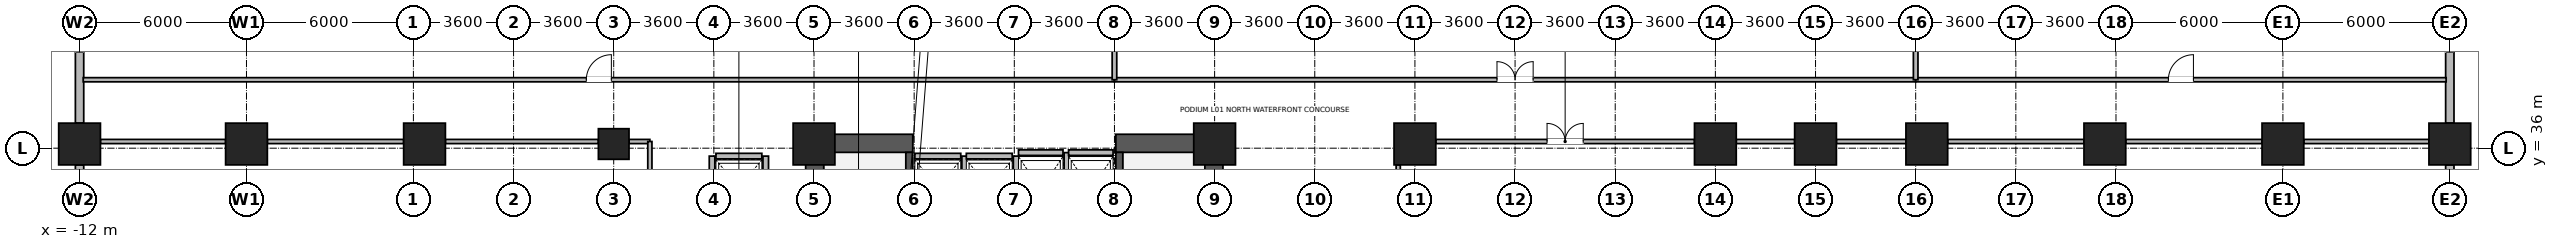
"""IFC4 building model, lengths in metres.
Left out: names, types, materials, properties, quantities, classifications, styles, units other than length and angle.
Written with IfcOpenShell. Run it as: python <this file> out.ifc"""

import sys

from ifc_helpers import new_model, si_unit, direction, frame, frame_2d, origin, origin_2d, place, context, subcontext, project, spatial, rectangle, circle, extrude, source, transform, mapped, element, fill, save


model = new_model("IFC4")
c1 = context("Model", 3, precision=1e-05, world=origin(), true_north=direction((0.0, 1.0)))
c2 = subcontext(c1, "Body", "Model", "MODEL_VIEW")
j1 = project(units=[si_unit("LENGTHUNIT", "METRE"), si_unit("PLANEANGLEUNIT", "RADIAN")], contexts=[c1])
p1 = place(None, origin())
s1 = spatial("IfcSite", under=j1, at=p1, CompositionType="ELEMENT")
p2 = place(p1, origin())
s2 = spatial("IfcBuilding", under=s1, at=p2, CompositionType="ELEMENT")
p3 = place(p2, frame((0.0, 0.0, 5.4)))
s3 = spatial("IfcBuildingStorey", under=s2, at=p3, CompositionType="ELEMENT", Elevation=5.4)
for number, where, z_axis, x_axis in (
    (1, (14.425, 28.2, 0.0), (0.0, 0.0, 1.0), (0.0, 1.0, 0.0)),
    (2, (28.775, 28.2, 0.0), (0.0, 0.0, 1.0), (0.0, 1.0, 0.0)),
):
    element("IfcWall", number, at=place(p3, frame(where, z_axis=z_axis, x_axis=x_axis)), inside=s3, PredefinedType="SHEAR", context=c2, shape_type="SweptSolid", body=[
        extrude(rectangle(XDim=8.3, YDim=0.65, at=frame_2d((4.15, 0.0))), origin(), (0.0, 0.0, 1.0), 4.52),
    ])
for number, where, z_axis, x_axis in (
    (3, (14.75, 36.175, 0.0), (0.0, 0.0, 1.0), (1.0, 0.0, 0.0)),
    (4, (25.25, 36.175, 0.0), (0.0, 0.0, 1.0), (1.0, 0.0, 0.0)),
):
    element("IfcWall", number, at=place(p3, frame(where, z_axis=z_axis, x_axis=x_axis)), inside=s3, PredefinedType="SHEAR", context=c2, shape_type="SweptSolid", body=[
        extrude(rectangle(XDim=3.2, YDim=0.65, at=frame_2d((1.6, 0.0))), origin(), (0.0, 0.0, 1.0), 4.52),
    ])
p4 = place(p3, frame((17.825, 28.85, 0.0), z_axis=(0.0, 0.0, 1.0), x_axis=(0.0, 1.0, 0.0)))
e5 = element("IfcWall", 5, at=p4, inside=s3, PredefinedType="SHEAR", context=c2, shape_type="SweptSolid", body=[
    extrude(rectangle(XDim=7.0, YDim=0.25, at=frame_2d((3.5, 0.0))), origin(), (0.0, 0.0, 1.0), 4.52),
])
p5 = place(p4, frame((0.15, 0.0, 0.0)))
e6 = element("IfcOpeningElement", 6, at=p5, cuts=e5, PredefinedType="OPENING", context=c2, shape_type="SweptSolid", body=[
    extrude(rectangle(XDim=1.1, YDim=2.08, at=frame_2d((0.55, 1.04))), frame((0.0, 0.135, 0.0), z_axis=(0.0, -1.0, 0.0), x_axis=(1.0, 0.0, 0.0)), (0.0, 0.0, 1.0), 0.27),
])
p6 = place(p3, frame((25.375, 28.85, 0.0), z_axis=(0.0, 0.0, 1.0), x_axis=(0.0, 1.0, 0.0)))
e7 = element("IfcWall", 7, at=p6, inside=s3, PredefinedType="SHEAR", context=c2, shape_type="SweptSolid", body=[
    extrude(rectangle(XDim=7.0, YDim=0.25, at=frame_2d((3.5, 0.0))), origin(), (0.0, 0.0, 1.0), 4.52),
])
p7 = place(p6, frame((0.15, 0.0, 0.0)))
e8 = element("IfcOpeningElement", 8, at=p7, cuts=e7, PredefinedType="OPENING", context=c2, shape_type="SweptSolid", body=[
    extrude(rectangle(XDim=1.1, YDim=2.08, at=frame_2d((0.55, 1.04))), frame((0.0, 0.135, 0.0), z_axis=(0.0, -1.0, 0.0), x_axis=(1.0, 0.0, 0.0)), (0.0, 0.0, 1.0), 0.27),
])
m1 = source(origin(), c2, "Body", "SweptSolid", [
    extrude(circle(Radius=0.55, at=origin_2d()), origin(), (0.0, 0.0, 1.0), 4.8),
])
p8 = place(p3, frame((7.2, 36.15, 0.0), z_axis=(0.0, 0.0, 1.0), x_axis=(1.0, 0.0, 0.0)))
e9 = element("IfcColumn", 9, at=p8, inside=s3, PredefinedType="COLUMN", context=c2, shape_type="MappedRepresentation", body=[
    mapped(m1, transform((0.0, 0.0, 0.0), x_axis=(1.0, 0.0, 0.0), y_axis=(0.0, 1.0, 0.0), z_axis=(0.0, 0.0, 1.0), scale=1.0)),
])
m2 = source(origin(), c2, "Body", "SweptSolid", [
    extrude(rectangle(XDim=1.5, YDim=1.5, at=origin_2d()), origin(), (0.0, 0.0, 1.0), 4.8),
])
for number, where, z_axis, x_axis in (
    (10, (14.4, 36.15, 0.0), (0.0, 0.0, 1.0), (1.0, 0.0, 0.0)),
    (11, (28.8, 36.15, 0.0), (0.0, 0.0, 1.0), (1.0, 0.0, 0.0)),
    (12, (36.0, 36.15, 0.0), (0.0, 0.0, 1.0), (1.0, 0.0, 0.0)),
    (13, (46.8, 36.15, 0.0), (0.0, 0.0, 1.0), (1.0, 0.0, 0.0)),
    (14, (50.4, 36.15, 0.0), (0.0, 0.0, 1.0), (1.0, 0.0, 0.0)),
    (15, (54.4, 36.15, 0.0), (0.0, 0.0, 1.0), (1.0, 0.0, 0.0)),
    (16, (0.4, 36.15, 0.0), (0.0, 0.0, 1.0), (1.0, 0.0, 0.0)),
    (17, (60.8, 36.15, 0.0), (0.0, 0.0, 1.0), (1.0, 0.0, 0.0)),
    (18, (-12.0, 36.15, 0.0), (0.0, 0.0, 1.0), (1.0, 0.0, 0.0)),
    (19, (-6.0, 36.15, 0.0), (0.0, 0.0, 1.0), (1.0, 0.0, 0.0)),
    (20, (67.2, 36.15, 0.0), (0.0, 0.0, 1.0), (1.0, 0.0, 0.0)),
    (21, (73.2, 36.15, 0.0), (0.0, 0.0, 1.0), (1.0, 0.0, 0.0)),
):
    element("IfcColumn", number, at=place(p3, frame(where, z_axis=z_axis, x_axis=x_axis)), inside=s3, PredefinedType="COLUMN", context=c2, shape_type="MappedRepresentation", body=[
        mapped(m2, transform((0.0, 0.0, 0.0), x_axis=(1.0, 0.0, 0.0), y_axis=(0.0, 1.0, 0.0), z_axis=(0.0, 0.0, 1.0), scale=1.0)),
    ])
p9 = place(p3, frame((73.2, 35.399, 0.0), z_axis=(0.0, 0.0, 1.0), x_axis=(0.0, -1.0, 0.0)))
e22 = element("IfcWall", 22, at=p9, inside=s3, PredefinedType="STANDARD", context=c2, shape_type="SweptSolid", body=[
    extrude(rectangle(XDim=5.998, YDim=0.3, at=frame_2d((2.999, 0.0))), origin(), (0.0, 0.0, 1.0), 3.9),
])
p10 = place(p9, frame((2.524, 0.0, 0.9)))
e23 = element("IfcOpeningElement", 23, at=p10, cuts=e22, PredefinedType="OPENING", context=c2, shape_type="SweptSolid", body=[
    extrude(rectangle(XDim=0.95, YDim=1.75, at=frame_2d((0.475, 0.875))), frame((0.0, 0.16, 0.0), z_axis=(0.0, -1.0, 0.0), x_axis=(1.0, 0.0, 0.0)), (0.0, 0.0, 1.0), 0.32),
])
p11 = place(p9, frame((1.037, 0.0, 0.9)))
e24 = element("IfcOpeningElement", 24, at=p11, cuts=e22, PredefinedType="OPENING", context=c2, shape_type="SweptSolid", body=[
    extrude(rectangle(XDim=0.95, YDim=1.75, at=frame_2d((0.475, 0.875))), frame((0.0, 0.16, 0.0), z_axis=(0.0, -1.0, 0.0), x_axis=(1.0, 0.0, 0.0)), (0.0, 0.0, 1.0), 0.32),
])
p12 = place(p3, frame((73.2, 44.099, 0.0), z_axis=(0.0, 0.0, 1.0), x_axis=(0.0, -1.0, 0.0)))
e25 = element("IfcWall", 25, at=p12, inside=s3, PredefinedType="STANDARD", context=c2, shape_type="SweptSolid", body=[
    extrude(rectangle(XDim=7.198, YDim=0.3, at=frame_2d((3.599, 0.0))), origin(), (0.0, 0.0, 1.0), 3.9),
])
p13 = place(p12, frame((0.6, 0.0, 0.9)))
e26 = element("IfcOpeningElement", 26, at=p13, cuts=e25, PredefinedType="OPENING", context=c2, shape_type="SweptSolid", body=[
    extrude(rectangle(XDim=2.4, YDim=2.5, at=frame_2d((1.2, 1.25))), frame((0.0, 0.16, 0.0), z_axis=(0.0, -1.0, 0.0), x_axis=(1.0, 0.0, 0.0)), (0.0, 0.0, 1.0), 0.32),
])
p14 = place(p12, frame((3.7, 0.0, 0.9)))
e27 = element("IfcOpeningElement", 27, at=p14, cuts=e25, PredefinedType="OPENING", context=c2, shape_type="SweptSolid", body=[
    extrude(rectangle(XDim=0.95, YDim=1.75, at=frame_2d((0.475, 0.875))), frame((0.0, 0.16, 0.0), z_axis=(0.0, -1.0, 0.0), x_axis=(1.0, 0.0, 0.0)), (0.0, 0.0, 1.0), 0.32),
])
p15 = place(p3, frame((-12.0, 36.901, 0.0), z_axis=(0.0, 0.0, 1.0), x_axis=(0.0, 1.0, 0.0)))
e28 = element("IfcWall", 28, at=p15, inside=s3, PredefinedType="STANDARD", context=c2, shape_type="SweptSolid", body=[
    extrude(rectangle(XDim=7.198, YDim=0.3, at=frame_2d((3.599, 0.0))), origin(), (0.0, 0.0, 1.0), 3.9),
])
p16 = place(p15, frame((4.198, 0.0, 0.9)))
e29 = element("IfcOpeningElement", 29, at=p16, cuts=e28, PredefinedType="OPENING", context=c2, shape_type="SweptSolid", body=[
    extrude(rectangle(XDim=2.4, YDim=2.5, at=frame_2d((1.2, 1.25))), frame((0.0, 0.16, 0.0), z_axis=(0.0, -1.0, 0.0), x_axis=(1.0, 0.0, 0.0)), (0.0, 0.0, 1.0), 0.32),
])
p17 = place(p15, frame((2.548, 0.0, 0.9)))
e30 = element("IfcOpeningElement", 30, at=p17, cuts=e28, PredefinedType="OPENING", context=c2, shape_type="SweptSolid", body=[
    extrude(rectangle(XDim=0.95, YDim=1.75, at=frame_2d((0.475, 0.875))), frame((0.0, 0.16, 0.0), z_axis=(0.0, -1.0, 0.0), x_axis=(1.0, 0.0, 0.0)), (0.0, 0.0, 1.0), 0.32),
])
p18 = place(p3, frame((-12.0, 29.401, 0.0), z_axis=(0.0, 0.0, 1.0), x_axis=(0.0, 1.0, 0.0)))
e31 = element("IfcWall", 31, at=p18, inside=s3, PredefinedType="STANDARD", context=c2, shape_type="SweptSolid", body=[
    extrude(rectangle(XDim=5.998, YDim=0.3, at=frame_2d((2.999, 0.0))), origin(), (0.0, 0.0, 1.0), 3.9),
])
p19 = place(p18, frame((2.524, 0.0, 0.9)))
e32 = element("IfcOpeningElement", 32, at=p19, cuts=e31, PredefinedType="OPENING", context=c2, shape_type="SweptSolid", body=[
    extrude(rectangle(XDim=0.95, YDim=1.75, at=frame_2d((0.475, 0.875))), frame((0.0, 0.16, 0.0), z_axis=(0.0, -1.0, 0.0), x_axis=(1.0, 0.0, 0.0)), (0.0, 0.0, 1.0), 0.32),
])
p20 = place(p18, frame((1.037, 0.0, 0.9)))
e33 = element("IfcOpeningElement", 33, at=p20, cuts=e31, PredefinedType="OPENING", context=c2, shape_type="SweptSolid", body=[
    extrude(rectangle(XDim=0.95, YDim=1.75, at=frame_2d((0.475, 0.875))), frame((0.0, 0.16, 0.0), z_axis=(0.0, -1.0, 0.0), x_axis=(1.0, 0.0, 0.0)), (0.0, 0.0, 1.0), 0.32),
])
p21 = place(p3, frame((18.025, 35.715, 0.0), z_axis=(0.0, 0.0, 1.0), x_axis=(1.0, 0.0, 0.0)))
e34 = element("IfcWall", 34, at=p21, inside=s3, PredefinedType="PARTITIONING", context=c2, shape_type="SweptSolid", body=[
    extrude(rectangle(XDim=1.65, YDim=0.2, at=frame_2d((0.825, 0.0))), origin(), (0.0, 0.0, 1.0), 4.5),
])
p22 = place(p3, frame((19.815, 33.485, 0.0), z_axis=(0.0, 0.0, 1.0), x_axis=(0.0, 1.0, 0.0)))
e35 = element("IfcWall", 35, at=p22, inside=s3, PredefinedType="PARTITIONING", context=c2, shape_type="SweptSolid", body=[
    extrude(rectangle(XDim=2.23, YDim=0.2, at=frame_2d((1.115, 0.0))), origin(), (0.0, 0.0, 1.0), 4.5),
])
p23 = place(p3, frame((19.875, 35.715, 0.0), z_axis=(0.0, 0.0, 1.0), x_axis=(1.0, 0.0, 0.0)))
e36 = element("IfcWall", 36, at=p23, inside=s3, PredefinedType="PARTITIONING", context=c2, shape_type="SweptSolid", body=[
    extrude(rectangle(XDim=1.65, YDim=0.2, at=frame_2d((0.825, 0.0))), origin(), (0.0, 0.0, 1.0), 4.5),
])
p24 = place(p3, frame((21.665, 33.485, 0.0), z_axis=(0.0, 0.0, 1.0), x_axis=(0.0, 1.0, 0.0)))
e37 = element("IfcWall", 37, at=p24, inside=s3, PredefinedType="PARTITIONING", context=c2, shape_type="SweptSolid", body=[
    extrude(rectangle(XDim=2.23, YDim=0.2, at=frame_2d((1.115, 0.0))), origin(), (0.0, 0.0, 1.0), 4.5),
])
p25 = place(p3, frame((10.875, 35.715, 0.0), z_axis=(0.0, 0.0, 1.0), x_axis=(1.0, 0.0, 0.0)))
e38 = element("IfcWall", 38, at=p25, inside=s3, PredefinedType="PARTITIONING", context=c2, shape_type="SweptSolid", body=[
    extrude(rectangle(XDim=1.65, YDim=0.2, at=frame_2d((0.825, 0.0))), origin(), (0.0, 0.0, 1.0), 4.5),
])
for number, where, z_axis, x_axis in (
    (39, (10.735, 33.485, 0.0), (0.0, 0.0, 1.0), (0.0, 1.0, 0.0)),
    (40, (12.665, 33.485, 0.0), (0.0, 0.0, 1.0), (0.0, 1.0, 0.0)),
):
    element("IfcWall", number, at=place(p3, frame(where, z_axis=z_axis, x_axis=x_axis)), inside=s3, PredefinedType="PARTITIONING", context=c2, shape_type="SweptSolid", body=[
        extrude(rectangle(XDim=2.23, YDim=0.2, at=frame_2d((1.115, 0.0))), origin(), (0.0, 0.0, 1.0), 4.5),
    ])
p26 = place(p3, frame((21.75, 35.84, 0.0), z_axis=(0.0, 0.0, 1.0), x_axis=(1.0, 0.0, 0.0)))
e41 = element("IfcWall", 41, at=p26, inside=s3, PredefinedType="PARTITIONING", context=c2, shape_type="SweptSolid", body=[
    extrude(rectangle(XDim=1.6, YDim=0.2, at=frame_2d((0.8, 0.0))), origin(), (0.0, 0.0, 1.0), 3.3),
])
p27 = place(p3, frame((23.49, 33.16, 0.0), z_axis=(0.0, 0.0, 1.0), x_axis=(0.0, 1.0, 0.0)))
e42 = element("IfcWall", 42, at=p27, inside=s3, PredefinedType="PARTITIONING", context=c2, shape_type="SweptSolid", body=[
    extrude(rectangle(XDim=2.68, YDim=0.2, at=frame_2d((1.34, 0.0))), origin(), (0.0, 0.0, 1.0), 4.5),
])
p28 = place(p3, frame((23.55, 35.84, 0.0), z_axis=(0.0, 0.0, 1.0), x_axis=(1.0, 0.0, 0.0)))
e43 = element("IfcWall", 43, at=p28, inside=s3, PredefinedType="PARTITIONING", context=c2, shape_type="SweptSolid", body=[
    extrude(rectangle(XDim=1.6, YDim=0.2, at=frame_2d((0.8, 0.0))), origin(), (0.0, 0.0, 1.0), 3.3),
])
p29 = place(p3, frame((36.75, 36.24, 0.0), z_axis=(0.0, 0.0, 1.0), x_axis=(1.0, 0.0, 0.0)))
e44 = element("IfcWall", 44, at=p29, inside=s3, PredefinedType="PARTITIONING", context=c2, shape_type="SweptSolid", body=[
    extrude(rectangle(XDim=9.3, YDim=0.15, at=frame_2d((4.65, 0.0))), origin(), (0.0, 0.0, 1.0), 3.8),
])
p30 = place(p29, frame((4.0, 0.0, 0.0)))
e45 = element("IfcOpeningElement", 45, at=p30, cuts=e44, PredefinedType="OPENING", context=c2, shape_type="SweptSolid", body=[
    extrude(rectangle(XDim=1.3, YDim=2.12, at=frame_2d((0.65, 1.06))), frame((0.0, 0.085, 0.0), z_axis=(0.0, -1.0, 0.0), x_axis=(1.0, 0.0, 0.0)), (0.0, 0.0, 1.0), 0.17),
])
p31 = place(p3, frame((47.55, 36.24, 0.0), z_axis=(0.0, 0.0, 1.0), x_axis=(1.0, 0.0, 0.0)))
e46 = element("IfcWall", 46, at=p31, inside=s3, PredefinedType="PARTITIONING", context=c2, shape_type="SweptSolid", body=[
    extrude(rectangle(XDim=2.1, YDim=0.15, at=frame_2d((1.05, 0.0))), origin(), (0.0, 0.0, 1.0), 3.8),
])
p32 = place(p3, frame((51.15, 36.24, 0.0), z_axis=(0.0, 0.0, 1.0), x_axis=(1.0, 0.0, 0.0)))
e47 = element("IfcWall", 47, at=p32, inside=s3, PredefinedType="PARTITIONING", context=c2, shape_type="SweptSolid", body=[
    extrude(rectangle(XDim=2.5, YDim=0.15, at=frame_2d((1.25, 0.0))), origin(), (0.0, 0.0, 1.0), 3.8),
])
p33 = place(p3, frame((55.15, 36.24, 0.0), z_axis=(0.0, 0.0, 1.0), x_axis=(1.0, 0.0, 0.0)))
e48 = element("IfcWall", 48, at=p33, inside=s3, PredefinedType="PARTITIONING", context=c2, shape_type="SweptSolid", body=[
    extrude(rectangle(XDim=4.9, YDim=0.15, at=frame_2d((2.45, 0.0))), origin(), (0.0, 0.0, 1.0), 3.8),
])
p34 = place(p3, frame((61.55, 36.24, 0.0), z_axis=(0.0, 0.0, 1.0), x_axis=(1.0, 0.0, 0.0)))
e49 = element("IfcWall", 49, at=p34, inside=s3, PredefinedType="PARTITIONING", context=c2, shape_type="SweptSolid", body=[
    extrude(rectangle(XDim=4.9, YDim=0.15, at=frame_2d((2.45, 0.0))), origin(), (0.0, 0.0, 1.0), 3.8),
])
p35 = place(p3, frame((67.95, 36.24, 0.0), z_axis=(0.0, 0.0, 1.0), x_axis=(1.0, 0.0, 0.0)))
e50 = element("IfcWall", 50, at=p35, inside=s3, PredefinedType="PARTITIONING", context=c2, shape_type="SweptSolid", body=[
    extrude(rectangle(XDim=4.5, YDim=0.15, at=frame_2d((2.25, 0.0))), origin(), (0.0, 0.0, 1.0), 3.8),
])
p36 = place(p3, frame((-11.868, 38.46, 0.0), z_axis=(0.0, 0.0, 1.0), x_axis=(1.0, 0.0, 0.0)))
e51 = element("IfcWall", 51, at=p36, inside=s3, PredefinedType="PARTITIONING", context=c2, shape_type="SweptSolid", body=[
    extrude(rectangle(XDim=37.068, YDim=0.15, at=frame_2d((18.534, 0.0))), origin(), (0.0, 0.0, 1.0), 4.5),
])
p37 = place(p36, frame((18.084, 0.0, 0.0)))
e52 = element("IfcOpeningElement", 52, at=p37, cuts=e51, PredefinedType="OPENING", context=c2, shape_type="SweptSolid", body=[
    extrude(rectangle(XDim=0.9, YDim=2.08, at=frame_2d((0.45, 1.04))), frame((0.0, 0.085, 0.0), z_axis=(0.0, -1.0, 0.0), x_axis=(1.0, 0.0, 0.0)), (0.0, 0.0, 1.0), 0.17),
])
p38 = place(p3, frame((25.2, 38.46, 0.0), z_axis=(0.0, 0.0, 1.0), x_axis=(1.0, 0.0, 0.0)))
e53 = element("IfcWall", 53, at=p38, inside=s3, PredefinedType="PARTITIONING", context=c2, shape_type="SweptSolid", body=[
    extrude(rectangle(XDim=28.8, YDim=0.15, at=frame_2d((14.4, 0.0))), origin(), (0.0, 0.0, 1.0), 4.5),
])
p39 = place(p38, frame((13.75, 0.0, 0.0)))
e54 = element("IfcOpeningElement", 54, at=p39, cuts=e53, PredefinedType="OPENING", context=c2, shape_type="SweptSolid", body=[
    extrude(rectangle(XDim=1.3, YDim=2.12, at=frame_2d((0.65, 1.06))), frame((0.0, 0.085, 0.0), z_axis=(0.0, -1.0, 0.0), x_axis=(1.0, 0.0, 0.0)), (0.0, 0.0, 1.0), 0.17),
])
p40 = place(p3, frame((35.4, 29.4, 0.0), z_axis=(0.0, 0.0, 1.0), x_axis=(0.0, 1.0, 0.0)))
e55 = element("IfcWall", 55, at=p40, inside=s3, PredefinedType="PARTITIONING", context=c2, shape_type="SweptSolid", body=[
    extrude(rectangle(XDim=6.0, YDim=0.15, at=frame_2d((3.0, 0.0))), origin(), (0.0, 0.0, 1.0), 4.5),
])
p41 = place(p3, frame((-11.25, 36.24, 0.0), z_axis=(0.0, 0.0, 1.0), x_axis=(1.0, 0.0, 0.0)))
e56 = element("IfcWall", 56, at=p41, inside=s3, PredefinedType="PARTITIONING", context=c2, shape_type="SweptSolid", body=[
    extrude(rectangle(XDim=4.5, YDim=0.15, at=frame_2d((2.25, 0.0))), origin(), (0.0, 0.0, 1.0), 3.8),
])
p42 = place(p3, frame((-5.25, 36.24, 0.0), z_axis=(0.0, 0.0, 1.0), x_axis=(1.0, 0.0, 0.0)))
e57 = element("IfcWall", 57, at=p42, inside=s3, PredefinedType="PARTITIONING", context=c2, shape_type="SweptSolid", body=[
    extrude(rectangle(XDim=4.9, YDim=0.15, at=frame_2d((2.45, 0.0))), origin(), (0.0, 0.0, 1.0), 3.8),
])
p43 = place(p3, frame((1.15, 36.24, 0.0), z_axis=(0.0, 0.0, 1.0), x_axis=(1.0, 0.0, 0.0)))
e58 = element("IfcWall", 58, at=p43, inside=s3, PredefinedType="PARTITIONING", context=c2, shape_type="SweptSolid", body=[
    extrude(rectangle(XDim=5.5, YDim=0.15, at=frame_2d((2.75, 0.0))), origin(), (0.0, 0.0, 1.0), 3.8),
])
p44 = place(p3, frame((7.75, 36.24, 0.0), z_axis=(0.0, 0.0, 1.0), x_axis=(1.0, 0.0, 0.0)))
e59 = element("IfcWall", 59, at=p44, inside=s3, PredefinedType="PARTITIONING", context=c2, shape_type="SweptSolid", body=[
    extrude(rectangle(XDim=0.75, YDim=0.15, at=frame_2d((0.375, 0.0))), origin(), (0.0, 0.0, 1.0), 3.8),
])
p45 = place(p3, frame((54.0, 38.46, 0.0), z_axis=(0.0, 0.0, 1.0), x_axis=(1.0, 0.0, 0.0)))
e60 = element("IfcWall", 60, at=p45, inside=s3, PredefinedType="PARTITIONING", context=c2, shape_type="SweptSolid", body=[
    extrude(rectangle(XDim=19.068, YDim=0.15, at=frame_2d((9.534, 0.0))), origin(), (0.0, 0.0, 1.0), 4.5),
])
p46 = place(p45, frame((9.084, 0.0, 0.0)))
e61 = element("IfcOpeningElement", 61, at=p46, cuts=e60, PredefinedType="OPENING", context=c2, shape_type="SweptSolid", body=[
    extrude(rectangle(XDim=0.9, YDim=2.08, at=frame_2d((0.45, 1.04))), frame((0.0, 0.085, 0.0), z_axis=(0.0, -1.0, 0.0), x_axis=(1.0, 0.0, 0.0)), (0.0, 0.0, 1.0), 0.17),
])
p47 = place(p3, frame((8.5, 28.56, 0.0), z_axis=(0.0, 0.0, 1.0), x_axis=(0.0, 1.0, 0.0)))
e62 = element("IfcWall", 62, at=p47, inside=s3, PredefinedType="PARTITIONING", context=c2, shape_type="SweptSolid", body=[
    extrude(rectangle(XDim=7.68, YDim=0.15, at=frame_2d((3.84, 0.0))), origin(), (0.0, 0.0, 1.0), 4.5),
])
for number, where, z_axis, x_axis in (
    (63, (25.2, 38.46, 0.0), (0.0, 0.0, 1.0), (0.0, 1.0, 0.0)),
    (64, (54.0, 38.46, 0.0), (0.0, 0.0, 1.0), (0.0, 1.0, 0.0)),
):
    element("IfcWall", number, at=place(p3, frame(where, z_axis=z_axis, x_axis=x_axis)), inside=s3, PredefinedType="PARTITIONING", context=c2, shape_type="SweptSolid", body=[
        extrude(rectangle(XDim=6.52, YDim=0.165, at=frame_2d((3.26, 0.0))), origin(), (0.0, 0.0, 1.0), 4.5),
    ])
p48 = place(p14, origin())
e65 = element("IfcWindow", 65, at=p48, inside=s3, PartitioningType="SINGLE_PANEL", PredefinedType="WINDOW", context=c2, shape_type="SweptSolid", body=[
    extrude(rectangle(XDim=0.95, YDim=1.75, at=frame_2d((0.475, 0.875))), frame((0.0, 0.03, 0.0), z_axis=(0.0, -1.0, 0.0), x_axis=(1.0, 0.0, 0.0)), (0.0, 0.0, 1.0), 0.06),
])
fill(e27, e65)
p49 = place(p17, origin())
e66 = element("IfcWindow", 66, at=p49, inside=s3, PartitioningType="SINGLE_PANEL", PredefinedType="WINDOW", context=c2, shape_type="SweptSolid", body=[
    extrude(rectangle(XDim=0.95, YDim=1.75, at=frame_2d((0.475, 0.875))), frame((0.0, 0.03, 0.0), z_axis=(0.0, -1.0, 0.0), x_axis=(1.0, 0.0, 0.0)), (0.0, 0.0, 1.0), 0.06),
])
fill(e30, e66)
p50 = place(p30, origin())
e67 = element("IfcDoor", 67, at=p50, inside=s3, OperationType="DOUBLE_DOOR_SINGLE_SWING", PredefinedType="DOOR", context=c2, shape_type="SweptSolid", body=[
    extrude(rectangle(XDim=1.3, YDim=2.12, at=frame_2d((0.65, 1.06))), frame((0.0, 0.025, 0.0), z_axis=(0.0, -1.0, 0.0), x_axis=(1.0, 0.0, 0.0)), (0.0, 0.0, 1.0), 0.05),
])
fill(e45, e67)
p51 = place(p37, origin())
e68 = element("IfcDoor", 68, at=p51, inside=s3, OperationType="SINGLE_SWING_RIGHT", PredefinedType="DOOR", context=c2, shape_type="SweptSolid", body=[
    extrude(rectangle(XDim=0.9, YDim=2.08, at=frame_2d((0.45, 1.04))), frame((0.0, 0.025, 0.0), z_axis=(0.0, -1.0, 0.0), x_axis=(1.0, 0.0, 0.0)), (0.0, 0.0, 1.0), 0.05),
])
fill(e52, e68)
p52 = place(p39, origin())
e69 = element("IfcDoor", 69, at=p52, inside=s3, OperationType="DOUBLE_DOOR_SINGLE_SWING", PredefinedType="DOOR", context=c2, shape_type="SweptSolid", body=[
    extrude(rectangle(XDim=1.3, YDim=2.12, at=frame_2d((0.65, 1.06))), frame((0.0, 0.025, 0.0), z_axis=(0.0, -1.0, 0.0), x_axis=(1.0, 0.0, 0.0)), (0.0, 0.0, 1.0), 0.05),
])
fill(e54, e69)
p53 = place(p46, origin())
e70 = element("IfcDoor", 70, at=p53, inside=s3, OperationType="SINGLE_SWING_RIGHT", PredefinedType="DOOR", context=c2, shape_type="SweptSolid", body=[
    extrude(rectangle(XDim=0.9, YDim=2.08, at=frame_2d((0.45, 1.04))), frame((0.0, 0.025, 0.0), z_axis=(0.0, -1.0, 0.0), x_axis=(1.0, 0.0, 0.0)), (0.0, 0.0, 1.0), 0.05),
])
fill(e61, e70)
save(model, sys.argv[1])
